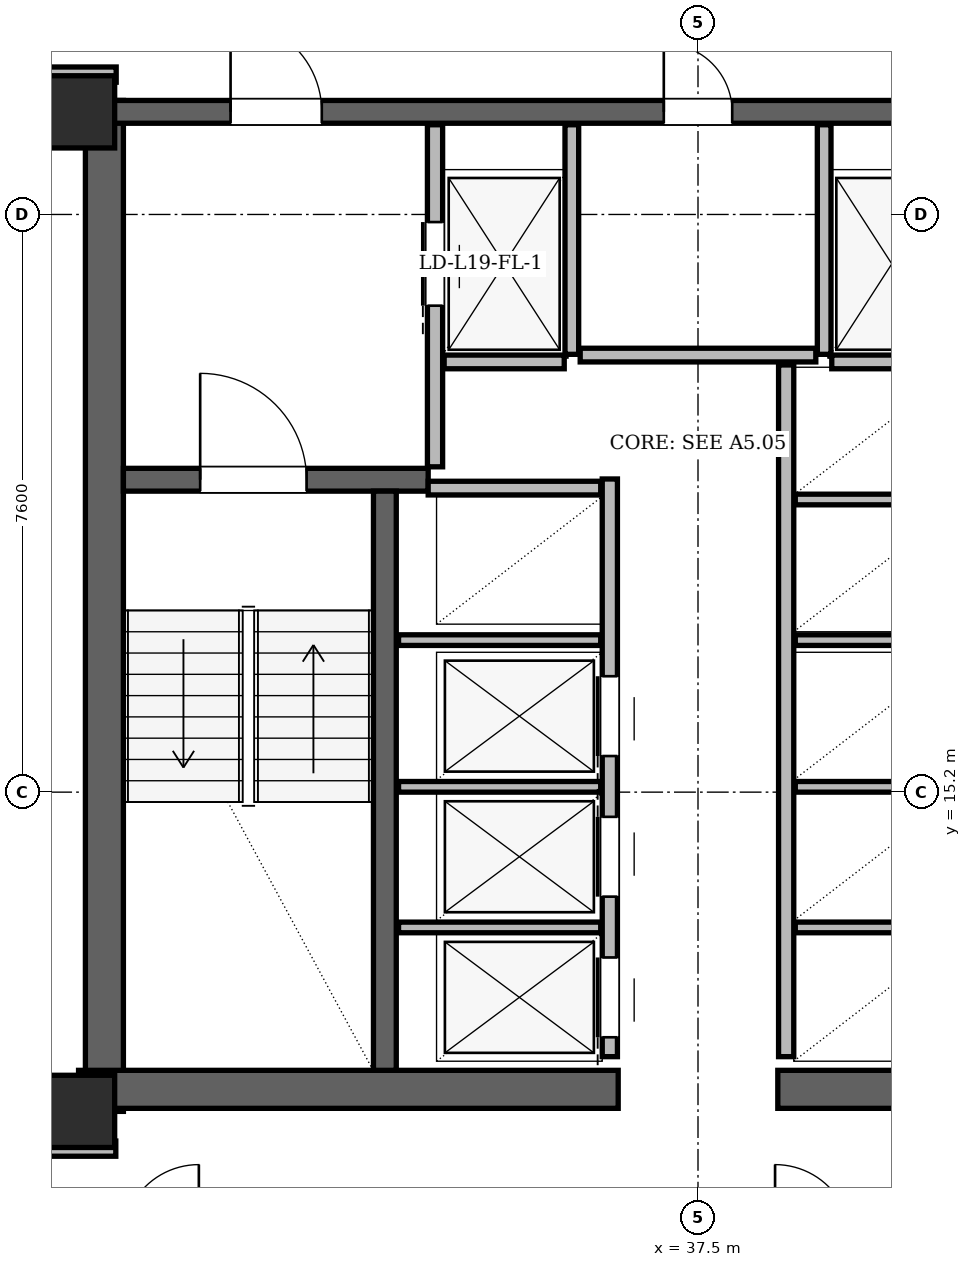
"""IFC4 building model, lengths in metres.
Left out: names, types, materials, properties, quantities, classifications, styles, units other than length and angle.
Written with IfcOpenShell. Run it as: python <this file> out.ifc"""

import sys

from ifc_helpers import new_model, si_unit, direction, frame, frame_2d, origin, origin_2d, place, context, subcontext, project, spatial, rectangle, hollow_rectangle, extrude, element, fill, save


model = new_model("IFC4")
c1 = context("Model", 3, precision=1e-05, world=origin(), true_north=direction((0.0, 1.0)))
c2 = subcontext(c1, "Body", "Model", "MODEL_VIEW")
j1 = project(units=[si_unit("LENGTHUNIT", "METRE"), si_unit("PLANEANGLEUNIT", "RADIAN")], contexts=[c1])
p1 = place(None, origin())
s1 = spatial("IfcSite", under=j1, at=p1, CompositionType="ELEMENT")
p2 = place(p1, origin())
s2 = spatial("IfcBuilding", under=s1, at=p2, CompositionType="ELEMENT")
p3 = place(p2, frame((0.0, 0.0, 74.1)))
s3 = spatial("IfcBuildingStorey", under=s2, at=p3, CompositionType="ELEMENT", Elevation=74.1)
for number, where, z_axis, x_axis in (
    (1, (29.35, 11.0, 0.0), (0.0, 0.0, 1.0), (1.0, 0.0, 0.0)),
    (2, (29.35, 24.15, 0.0), (0.0, 0.0, 1.0), (1.0, 0.0, 0.0)),
):
    element("IfcColumn", number, at=place(p3, frame(where, z_axis=z_axis, x_axis=x_axis)), inside=s3, PredefinedType="COLUMN", context=c2, shape_type="SweptSolid", body=[
        extrude(hollow_rectangle(XDim=0.95, YDim=0.95, WallThickness=0.08, at=origin_2d()), origin(), (0.0, 0.0, 1.0), 3.6),
    ])
p4 = place(p3, frame((29.69, 11.0, 0.0), z_axis=(0.0, 0.0, 1.0), x_axis=(0.0, 1.0, 0.0)))
e3 = element("IfcWall", 3, at=p4, inside=s3, PredefinedType="SHEAR", context=c2, shape_type="SweptSolid", body=[
    extrude(rectangle(XDim=13.3, YDim=0.5, at=frame_2d((6.65, 0.0))), origin(), (0.0, 0.0, 1.0), 3.34),
])
for number, where, z_axis, x_axis in (
    (4, (29.35, 11.29, 0.0), (0.0, 0.0, 1.0), (1.0, 0.0, 0.0)),
    (5, (38.55, 11.29, 0.0), (0.0, 0.0, 1.0), (1.0, 0.0, 0.0)),
):
    element("IfcWall", number, at=place(p3, frame(where, z_axis=z_axis, x_axis=x_axis)), inside=s3, PredefinedType="SHEAR", context=c2, shape_type="SweptSolid", body=[
        extrude(rectangle(XDim=7.1, YDim=0.5, at=frame_2d((3.55, 0.0))), origin(), (0.0, 0.0, 1.0), 3.34),
    ])
p5 = place(p3, frame((29.65, 24.15, 0.0), z_axis=(0.0, 0.0, 1.0), x_axis=(1.0, 0.0, 0.0)))
e6 = element("IfcWall", 6, at=p5, inside=s3, PredefinedType="SHEAR", context=c2, shape_type="SweptSolid", body=[
    extrude(rectangle(XDim=15.7, YDim=0.3, at=frame_2d((7.85, 0.0))), origin(), (0.0, 0.0, 1.0), 3.34),
])
p6 = place(p5, frame((1.7, 0.0, 0.0)))
e7 = element("IfcOpeningElement", 7, at=p6, cuts=e6, PredefinedType="OPENING", context=c2, shape_type="SweptSolid", body=[
    extrude(rectangle(XDim=1.2, YDim=2.2, at=frame_2d((0.6, 1.1))), frame((0.0, 0.15, 0.0), z_axis=(0.0, -1.0, 0.0), x_axis=(1.0, 0.0, 0.0)), (0.0, 0.0, 1.0), 0.3),
])
p7 = place(p5, frame((12.8, 0.0, 0.0)))
e8 = element("IfcOpeningElement", 8, at=p7, cuts=e6, PredefinedType="OPENING", context=c2, shape_type="SweptSolid", body=[
    extrude(rectangle(XDim=1.2, YDim=2.2, at=frame_2d((0.6, 1.1))), frame((0.0, 0.15, 0.0), z_axis=(0.0, -1.0, 0.0), x_axis=(1.0, 0.0, 0.0)), (0.0, 0.0, 1.0), 0.3),
])
p8 = place(p5, frame((7.4, 0.0, 0.0)))
e9 = element("IfcOpeningElement", 9, at=p8, cuts=e6, PredefinedType="OPENING", context=c2, shape_type="SweptSolid", body=[
    extrude(rectangle(XDim=0.9, YDim=2.05, at=frame_2d((0.45, 1.025))), frame((0.0, 0.15, 0.0), z_axis=(0.0, -1.0, 0.0), x_axis=(1.0, 0.0, 0.0)), (0.0, 0.0, 1.0), 0.3),
])
p9 = place(p3, frame((29.94, 19.31, 0.0), z_axis=(0.0, 0.0, 1.0), x_axis=(1.0, 0.0, 0.0)))
e10 = element("IfcWall", 10, at=p9, inside=s3, PredefinedType="SHEAR", context=c2, shape_type="SweptSolid", body=[
    extrude(rectangle(XDim=4.01, YDim=0.3, at=frame_2d((2.005, 0.0))), origin(), (0.0, 0.0, 1.0), 3.34),
])
p10 = place(p9, frame((1.01, 0.0, 0.0)))
e11 = element("IfcOpeningElement", 11, at=p10, cuts=e10, PredefinedType="OPENING", context=c2, shape_type="SweptSolid", body=[
    extrude(rectangle(XDim=1.4, YDim=2.2, at=frame_2d((0.7, 1.1))), frame((0.0, 0.15, 0.0), z_axis=(0.0, -1.0, 0.0), x_axis=(1.0, 0.0, 0.0)), (0.0, 0.0, 1.0), 0.3),
])
p11 = place(p3, frame((33.38, 11.54, 0.0), z_axis=(0.0, 0.0, 1.0), x_axis=(0.0, 1.0, 0.0)))
e12 = element("IfcWall", 12, at=p11, inside=s3, PredefinedType="SHEAR", context=c2, shape_type="SweptSolid", body=[
    extrude(rectangle(XDim=7.62, YDim=0.3, at=frame_2d((3.81, 0.0))), origin(), (0.0, 0.0, 1.0), 3.34),
])
p12 = place(p3, frame((30.876, 43.518, 0.0), z_axis=(0.0, 0.0, 1.0), x_axis=(-0.500000596145, -0.8660250596, 0.0)))
e13 = element("IfcWall", 13, at=p12, inside=s3, PredefinedType="SOLIDWALL", context=c2, shape_type="SweptSolid", body=[
    extrude(rectangle(XDim=33.938, YDim=0.34, at=frame_2d((16.969, 0.0))), origin(), (0.0, 0.0, 1.0), 2.474),
])
p13 = place(p12, frame((7.824, 0.0, 0.0)))
e14 = element("IfcOpeningElement", 14, at=p13, cuts=e13, PredefinedType="OPENING", context=c2, shape_type="SweptSolid", body=[
    extrude(rectangle(XDim=1.5, YDim=2.2, at=frame_2d((0.75, 1.1))), frame((0.0, 0.17, 0.0), z_axis=(0.0, -1.0, 0.0), x_axis=(1.0, 0.0, 0.0)), (0.0, 0.0, 1.0), 0.34),
])
p14 = place(p12, frame((25.439, 0.0, 0.0)))
e15 = element("IfcOpeningElement", 15, at=p14, cuts=e13, PredefinedType="OPENING", context=c2, shape_type="SweptSolid", body=[
    extrude(rectangle(XDim=1.5, YDim=2.2, at=frame_2d((0.75, 1.1))), frame((0.0, 0.17, 0.0), z_axis=(0.0, -1.0, 0.0), x_axis=(1.0, 0.0, 0.0)), (0.0, 0.0, 1.0), 0.34),
])
p15 = place(p12, frame((30.161, 0.0, 0.85)))
e16 = element("IfcOpeningElement", 16, at=p15, cuts=e13, PredefinedType="OPENING", context=c2, shape_type="SweptSolid", body=[
    extrude(rectangle(XDim=2.0, YDim=1.514, at=frame_2d((1.0, 0.757))), frame((0.0, 0.17, 0.0), z_axis=(0.0, -1.0, 0.0), x_axis=(1.0, 0.0, 0.0)), (0.0, 0.0, 1.0), 0.34),
])
p16 = place(p12, frame((1.755, 0.0, 0.85)))
e17 = element("IfcOpeningElement", 17, at=p16, cuts=e13, PredefinedType="OPENING", context=c2, shape_type="SweptSolid", body=[
    extrude(rectangle(XDim=1.2, YDim=1.474, at=frame_2d((0.6, 0.737))), frame((0.0, 0.17, 0.0), z_axis=(0.0, -1.0, 0.0), x_axis=(1.0, 0.0, 0.0)), (0.0, 0.0, 1.0), 0.34),
])
p17 = place(p12, frame((11.834, 0.0, 0.85)))
e18 = element("IfcOpeningElement", 18, at=p17, cuts=e13, PredefinedType="OPENING", context=c2, shape_type="SweptSolid", body=[
    extrude(rectangle(XDim=1.2, YDim=1.474, at=frame_2d((0.6, 0.737))), frame((0.0, 0.17, 0.0), z_axis=(0.0, -1.0, 0.0), x_axis=(1.0, 0.0, 0.0)), (0.0, 0.0, 1.0), 0.34),
])
p18 = place(p12, frame((14.358, 0.0, 0.85)))
e19 = element("IfcOpeningElement", 19, at=p18, cuts=e13, PredefinedType="OPENING", context=c2, shape_type="SweptSolid", body=[
    extrude(rectangle(XDim=1.2, YDim=1.474, at=frame_2d((0.6, 0.737))), frame((0.0, 0.17, 0.0), z_axis=(0.0, -1.0, 0.0), x_axis=(1.0, 0.0, 0.0)), (0.0, 0.0, 1.0), 0.34),
])
p19 = place(p12, frame((17.071, 0.0, 0.85)))
e20 = element("IfcOpeningElement", 20, at=p19, cuts=e13, PredefinedType="OPENING", context=c2, shape_type="SweptSolid", body=[
    extrude(rectangle(XDim=1.2, YDim=1.474, at=frame_2d((0.6, 0.737))), frame((0.0, 0.17, 0.0), z_axis=(0.0, -1.0, 0.0), x_axis=(1.0, 0.0, 0.0)), (0.0, 0.0, 1.0), 0.34),
])
p20 = place(p12, frame((32.628, 0.0, 0.85)))
e21 = element("IfcOpeningElement", 21, at=p20, cuts=e13, PredefinedType="OPENING", context=c2, shape_type="SweptSolid", body=[
    extrude(rectangle(XDim=0.7, YDim=1.2, at=frame_2d((0.35, 0.6))), frame((0.0, 0.17, 0.0), z_axis=(0.0, -1.0, 0.0), x_axis=(1.0, 0.0, 0.0)), (0.0, 0.0, 1.0), 0.34),
])
p21 = place(p3, frame((34.04, 19.48, 0.0), z_axis=(0.0, 0.0, 1.0), x_axis=(0.0, 1.0, 0.0)))
e22 = element("IfcWall", 22, at=p21, inside=s3, PredefinedType="PARTITIONING", context=c2, shape_type="SweptSolid", body=[
    extrude(rectangle(XDim=4.5, YDim=0.2, at=frame_2d((2.25, 0.0))), origin(), (0.0, 0.0, 1.0), 2.38),
])
p22 = place(p21, frame((2.12, 0.0, 0.0)))
e23 = element("IfcOpeningElement", 23, at=p22, cuts=e22, PredefinedType="OPENING", context=c2, shape_type="SweptSolid", body=[
    extrude(rectangle(XDim=1.1, YDim=2.2, at=frame_2d((0.55, 1.1))), frame((0.0, 0.1, 0.0), z_axis=(0.0, -1.0, 0.0), x_axis=(1.0, 0.0, 0.0)), (0.0, 0.0, 1.0), 0.2),
])
p23 = place(p3, frame((35.84, 20.96, 0.0), z_axis=(0.0, 0.0, 1.0), x_axis=(0.0, 1.0, 0.0)))
e24 = element("IfcWall", 24, at=p23, inside=s3, PredefinedType="PARTITIONING", context=c2, shape_type="SweptSolid", body=[
    extrude(rectangle(XDim=3.02, YDim=0.18, at=frame_2d((1.51, 0.0))), origin(), (0.0, 0.0, 1.0), 2.38),
])
p24 = place(p3, frame((34.16, 20.86, 0.0), z_axis=(0.0, 0.0, 1.0), x_axis=(1.0, 0.0, 0.0)))
e25 = element("IfcWall", 25, at=p24, inside=s3, PredefinedType="PARTITIONING", context=c2, shape_type="SweptSolid", body=[
    extrude(rectangle(XDim=1.58, YDim=0.18, at=frame_2d((0.79, 0.0))), origin(), (0.0, 0.0, 1.0), 3.34),
])
p25 = place(p3, frame((39.16, 20.96, 0.0), z_axis=(0.0, 0.0, 1.0), x_axis=(0.0, 1.0, 0.0)))
e26 = element("IfcWall", 26, at=p25, inside=s3, PredefinedType="PARTITIONING", context=c2, shape_type="SweptSolid", body=[
    extrude(rectangle(XDim=3.02, YDim=0.18, at=frame_2d((1.51, 0.0))), origin(), (0.0, 0.0, 1.0), 2.38),
])
p26 = place(p3, frame((39.26, 20.86, 0.0), z_axis=(0.0, 0.0, 1.0), x_axis=(1.0, 0.0, 0.0)))
e27 = element("IfcWall", 27, at=p26, inside=s3, PredefinedType="PARTITIONING", context=c2, shape_type="SweptSolid", body=[
    extrude(rectangle(XDim=1.58, YDim=0.18, at=frame_2d((0.79, 0.0))), origin(), (0.0, 0.0, 1.0), 3.34),
])
p27 = place(p3, frame((36.34, 11.72, 0.0), z_axis=(0.0, 0.0, 1.0), x_axis=(0.0, 1.0, 0.0)))
e28 = element("IfcWall", 28, at=p27, inside=s3, PredefinedType="PARTITIONING", context=c2, shape_type="SweptSolid", body=[
    extrude(rectangle(XDim=7.6, YDim=0.2, at=frame_2d((3.8, 0.0))), origin(), (0.0, 0.0, 1.0), 3.34),
])
p28 = place(p27, frame((0.255, 0.0, 0.0)))
e29 = element("IfcOpeningElement", 29, at=p28, cuts=e28, PredefinedType="OPENING", context=c2, shape_type="SweptSolid", body=[
    extrude(rectangle(XDim=1.05, YDim=2.15, at=frame_2d((0.525, 1.075))), frame((0.0, 0.1, 0.0), z_axis=(0.0, -1.0, 0.0), x_axis=(1.0, 0.0, 0.0)), (0.0, 0.0, 1.0), 0.2),
])
p29 = place(p27, frame((2.105, 0.0, 0.0)))
e30 = element("IfcOpeningElement", 30, at=p29, cuts=e28, PredefinedType="OPENING", context=c2, shape_type="SweptSolid", body=[
    extrude(rectangle(XDim=1.05, YDim=2.15, at=frame_2d((0.525, 1.075))), frame((0.0, 0.1, 0.0), z_axis=(0.0, -1.0, 0.0), x_axis=(1.0, 0.0, 0.0)), (0.0, 0.0, 1.0), 0.2),
])
p30 = place(p27, frame((3.955, 0.0, 0.0)))
e31 = element("IfcOpeningElement", 31, at=p30, cuts=e28, PredefinedType="OPENING", context=c2, shape_type="SweptSolid", body=[
    extrude(rectangle(XDim=1.05, YDim=2.15, at=frame_2d((0.525, 1.075))), frame((0.0, 0.1, 0.0), z_axis=(0.0, -1.0, 0.0), x_axis=(1.0, 0.0, 0.0)), (0.0, 0.0, 1.0), 0.2),
])
p31 = place(p3, frame((33.95, 19.2, 0.0), z_axis=(0.0, 0.0, 1.0), x_axis=(1.0, 0.0, 0.0)))
e32 = element("IfcWall", 32, at=p31, inside=s3, PredefinedType="PARTITIONING", context=c2, shape_type="SweptSolid", body=[
    extrude(rectangle(XDim=2.27, YDim=0.18, at=frame_2d((1.135, 0.0))), origin(), (0.0, 0.0, 1.0), 3.34),
])
for number, where, z_axis, x_axis in (
    (33, (33.56, 13.42, 0.0), (0.0, 0.0, 1.0), (1.0, 0.0, 0.0)),
    (34, (33.56, 15.27, 0.0), (0.0, 0.0, 1.0), (1.0, 0.0, 0.0)),
    (35, (33.56, 17.2, 0.0), (0.0, 0.0, 1.0), (1.0, 0.0, 0.0)),
):
    element("IfcWall", number, at=place(p3, frame(where, z_axis=z_axis, x_axis=x_axis)), inside=s3, PredefinedType="PARTITIONING", context=c2, shape_type="SweptSolid", body=[
        extrude(rectangle(XDim=2.66, YDim=0.14, at=frame_2d((1.33, 0.0))), origin(), (0.0, 0.0, 1.0), 3.34),
    ])
p32 = place(p3, frame((38.66, 11.72, 0.0), z_axis=(0.0, 0.0, 1.0), x_axis=(0.0, 1.0, 0.0)))
e36 = element("IfcWall", 36, at=p32, inside=s3, PredefinedType="PARTITIONING", context=c2, shape_type="SweptSolid", body=[
    extrude(rectangle(XDim=9.1, YDim=0.2, at=frame_2d((4.55, 0.0))), origin(), (0.0, 0.0, 1.0), 3.34),
])
for number, where, z_axis, x_axis in (
    (37, (38.78, 13.42, 0.0), (0.0, 0.0, 1.0), (1.0, 0.0, 0.0)),
    (38, (38.78, 15.27, 0.0), (0.0, 0.0, 1.0), (1.0, 0.0, 0.0)),
    (39, (38.78, 17.2, 0.0), (0.0, 0.0, 1.0), (1.0, 0.0, 0.0)),
    (40, (38.78, 19.05, 0.0), (0.0, 0.0, 1.0), (1.0, 0.0, 0.0)),
):
    element("IfcWall", number, at=place(p3, frame(where, z_axis=z_axis, x_axis=x_axis)), inside=s3, PredefinedType="PARTITIONING", context=c2, shape_type="SweptSolid", body=[
        extrude(rectangle(XDim=2.66, YDim=0.14, at=frame_2d((1.33, 0.0))), origin(), (0.0, 0.0, 1.0), 3.34),
    ])
p33 = place(p3, frame((35.95, 20.95, 0.0), z_axis=(0.0, 0.0, 1.0), x_axis=(1.0, 0.0, 0.0)))
e41 = element("IfcWall", 41, at=p33, inside=s3, PredefinedType="PARTITIONING", context=c2, shape_type="SweptSolid", body=[
    extrude(rectangle(XDim=3.1, YDim=0.18, at=frame_2d((1.55, 0.0))), origin(), (0.0, 0.0, 1.0), 3.34),
])
p34 = place(p3, frame((28.86, 10.51, 0.0), z_axis=(0.0, 0.0, 1.0), x_axis=(1.0, 0.0, 0.0)))
e42 = element("IfcWall", 42, at=p34, inside=s3, PredefinedType="PARTITIONING", context=c2, shape_type="SweptSolid", body=[
    extrude(rectangle(XDim=0.98, YDim=0.2, at=frame_2d((0.49, 0.0))), origin(), (0.0, 0.0, 1.0), 2.718),
])
p35 = place(p3, frame((28.855, 24.64, 0.0), z_axis=(0.0, 0.0, 1.0), x_axis=(1.0, 0.0, 0.0)))
e43 = element("IfcWall", 43, at=p35, inside=s3, PredefinedType="PARTITIONING", context=c2, shape_type="SweptSolid", body=[
    extrude(rectangle(XDim=0.99, YDim=0.2, at=frame_2d((0.495, 0.0))), origin(), (0.0, 0.0, 1.0), 2.718),
])
p36 = place(p22, origin())
e44 = element("IfcDoor", 44, at=p36, inside=s3, OperationType="SLIDING_TO_LEFT", PredefinedType="DOOR", context=c2, shape_type="SweptSolid", body=[
    extrude(rectangle(XDim=1.1, YDim=2.2, at=frame_2d((0.55, 1.1))), frame((0.0, 0.025, 0.0), z_axis=(0.0, -1.0, 0.0), x_axis=(1.0, 0.0, 0.0)), (0.0, 0.0, 1.0), 0.05),
])
fill(e23, e44)
p37 = place(p28, origin())
e45 = element("IfcDoor", 45, at=p37, inside=s3, OperationType="SLIDING_TO_LEFT", PredefinedType="DOOR", context=c2, shape_type="SweptSolid", body=[
    extrude(rectangle(XDim=1.05, YDim=2.15, at=frame_2d((0.525, 1.075))), frame((0.0, 0.025, 0.0), z_axis=(0.0, -1.0, 0.0), x_axis=(1.0, 0.0, 0.0)), (0.0, 0.0, 1.0), 0.05),
])
fill(e29, e45)
p38 = place(p29, origin())
e46 = element("IfcDoor", 46, at=p38, inside=s3, OperationType="SLIDING_TO_RIGHT", PredefinedType="DOOR", context=c2, shape_type="SweptSolid", body=[
    extrude(rectangle(XDim=1.05, YDim=2.15, at=frame_2d((0.525, 1.075))), frame((0.0, 0.025, 0.0), z_axis=(0.0, -1.0, 0.0), x_axis=(1.0, 0.0, 0.0)), (0.0, 0.0, 1.0), 0.05),
])
fill(e30, e46)
p39 = place(p30, origin())
e47 = element("IfcDoor", 47, at=p39, inside=s3, OperationType="SLIDING_TO_LEFT", PredefinedType="DOOR", context=c2, shape_type="SweptSolid", body=[
    extrude(rectangle(XDim=1.05, YDim=2.15, at=frame_2d((0.525, 1.075))), frame((0.0, 0.025, 0.0), z_axis=(0.0, -1.0, 0.0), x_axis=(1.0, 0.0, 0.0)), (0.0, 0.0, 1.0), 0.05),
])
fill(e31, e47)
p40 = place(p10, origin())
e48 = element("IfcDoor", 48, at=p40, inside=s3, OperationType="SINGLE_SWING_LEFT", PredefinedType="DOOR", context=c2, shape_type="SweptSolid", body=[
    extrude(rectangle(XDim=1.4, YDim=2.2, at=frame_2d((0.7, 1.1))), frame((0.0, 0.025, 0.0), z_axis=(0.0, -1.0, 0.0), x_axis=(1.0, 0.0, 0.0)), (0.0, 0.0, 1.0), 0.05),
])
fill(e11, e48)
p41 = place(p6, origin())
e49 = element("IfcDoor", 49, at=p41, inside=s3, OperationType="SINGLE_SWING_LEFT", PredefinedType="DOOR", context=c2, shape_type="SweptSolid", body=[
    extrude(rectangle(XDim=1.2, YDim=2.2, at=frame_2d((0.6, 1.1))), frame((0.0, 0.025, 0.0), z_axis=(0.0, -1.0, 0.0), x_axis=(1.0, 0.0, 0.0)), (0.0, 0.0, 1.0), 0.05),
])
fill(e7, e49)
p42 = place(p8, origin())
e50 = element("IfcDoor", 50, at=p42, inside=s3, OperationType="SINGLE_SWING_LEFT", PredefinedType="DOOR", context=c2, shape_type="SweptSolid", body=[
    extrude(rectangle(XDim=0.9, YDim=2.05, at=frame_2d((0.45, 1.025))), frame((0.0, 0.025, 0.0), z_axis=(0.0, -1.0, 0.0), x_axis=(1.0, 0.0, 0.0)), (0.0, 0.0, 1.0), 0.05),
])
fill(e9, e50)
save(model, sys.argv[1])
